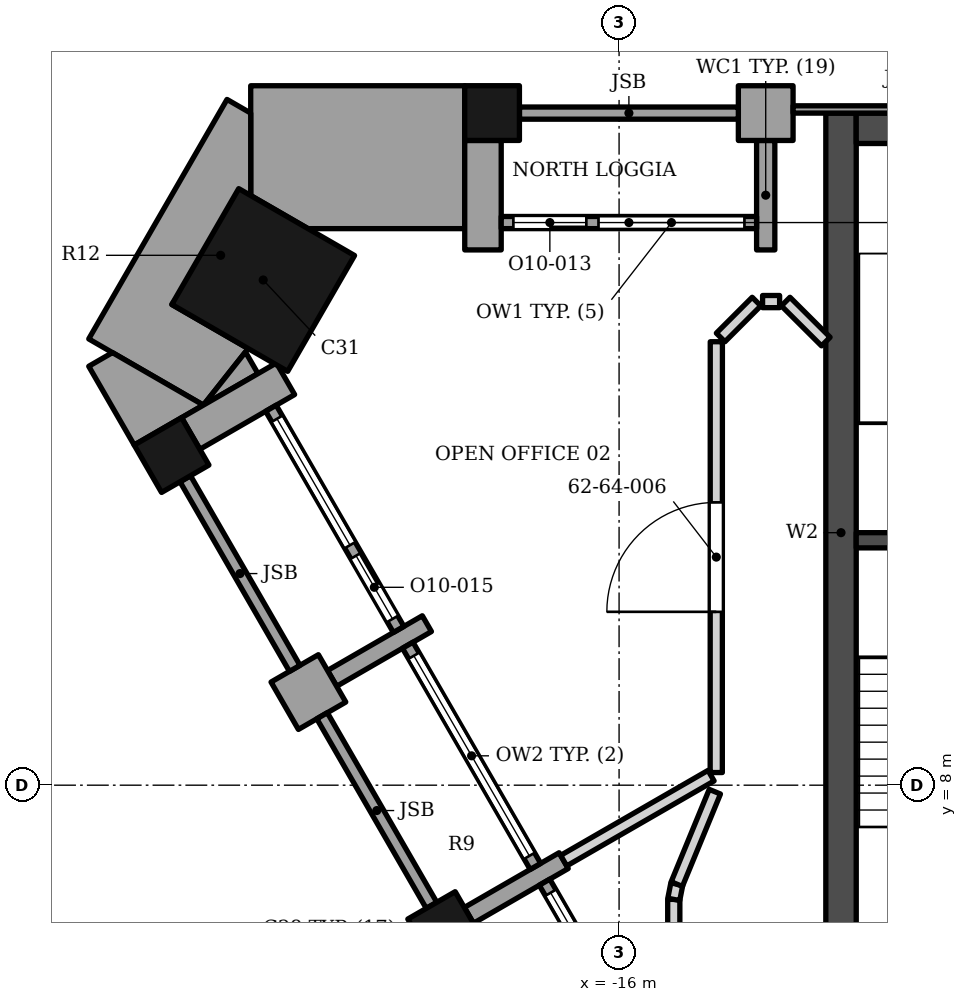
"""IFC4 building model, lengths in metres.
Left out: names, types, materials, properties, quantities, classifications, styles, units other than length and angle.
Written with IfcOpenShell. Run it as: python <this file> out.ifc"""

import sys

from ifc_helpers import new_model, si_unit, direction, frame, frame_2d, origin, origin_2d, place, context, subcontext, project, spatial, polyline, rectangle, outline, extrude, element, fill, save


model = new_model("IFC4")
c1 = context("Model", 3, precision=1e-05, world=origin(), true_north=direction((0.0, 1.0)))
c2 = subcontext(c1, "Body", "Model", "MODEL_VIEW")
j1 = project(units=[si_unit("LENGTHUNIT", "METRE"), si_unit("PLANEANGLEUNIT", "RADIAN")], contexts=[c1])
p1 = place(None, origin())
s1 = spatial("IfcSite", under=j1, at=p1, CompositionType="ELEMENT")
p2 = place(p1, origin())
s2 = spatial("IfcBuilding", under=s1, at=p2, CompositionType="ELEMENT")
p3 = place(p2, frame((0.0, 0.0, 259.9)))
s3 = spatial("IfcBuildingStorey", under=s2, at=p3, CompositionType="ELEMENT", Elevation=259.9)
p4 = place(p3, frame((-12.1, 18.802, 0.0), z_axis=(0.0, 0.0, 1.0), x_axis=(1.0, 0.0, 0.0)))
e1 = element("IfcWall", 1, at=p4, inside=s3, PredefinedType="SHEAR", context=c2, shape_type="SweptSolid", body=[
    extrude(rectangle(XDim=24.2, YDim=0.5, at=frame_2d((12.1, 0.0))), origin(), (0.0, 0.0, 1.0), 3.9),
])
p5 = place(p3, frame((-12.35, 5.253, 0.0), z_axis=(0.0, 0.0, 1.0), x_axis=(0.0, 1.0, 0.0)))
e2 = element("IfcWall", 2, at=p5, inside=s3, PredefinedType="SHEAR", context=c2, shape_type="SweptSolid", body=[
    extrude(rectangle(XDim=13.8, YDim=0.5, at=frame_2d((6.9, 0.0))), origin(), (0.0, 0.0, 1.0), 3.9),
])
p6 = place(p3, frame((-12.1, 12.028, 0.0), z_axis=(0.0, 0.0, 1.0), x_axis=(1.0, 0.0, 0.0)))
e3 = element("IfcWall", 3, at=p6, inside=s3, PredefinedType="SHEAR", context=c2, shape_type="SweptSolid", body=[
    extrude(rectangle(XDim=3.75, YDim=0.25, at=frame_2d((1.875, 0.0))), origin(), (0.0, 0.0, 1.0), 3.9),
])
p7 = place(p3, frame((-21.853, 16.308, 0.0), z_axis=(0.0, 0.0, 1.0), x_axis=(0.866025421238, -0.49999996977, 0.0)))
e4 = element("IfcColumn", 4, at=p7, inside=s3, PredefinedType="COLUMN", context=c2, shape_type="SweptSolid", body=[
    extrude(rectangle(XDim=2.2, YDim=2.2, at=origin_2d()), origin(), (0.0, 0.0, 1.0), 3.9),
])
for number, where, z_axis, x_axis in (
    (5, (-23.36, 13.429, 0.0), (0.0, 0.0, 1.0), (0.5, -0.866, 0.0)),
    (6, (-18.86, 5.634, 0.0), (0.0, 0.0, 1.0), (0.5, -0.866, 0.0)),
    (7, (-18.089, 19.053, 0.0), (0.0, 0.0, 1.0), (-1.0, 0.0, 0.0)),
):
    element("IfcColumn", number, at=place(p3, frame(where, z_axis=z_axis, x_axis=x_axis)), inside=s3, PredefinedType="COLUMN", context=c2, shape_type="SweptSolid", body=[
        extrude(rectangle(XDim=0.9, YDim=0.9, at=origin_2d()), origin(), (0.0, 0.0, 1.0), 3.9),
    ])
p8 = place(p3, frame((-21.486, 14.684, 0.0), z_axis=(0.0, 0.0, 1.0), x_axis=(-0.865989075817, -0.500062916607, 0.0)))
e8 = element("IfcWall", 8, at=p8, inside=s3, PredefinedType="SOLIDWALL", context=c2, shape_type="SweptSolid", body=[
    extrude(rectangle(XDim=1.8, YDim=0.6, at=frame_2d((0.9, 0.0))), origin(), (0.0, 0.0, 1.0), 3.0),
])
p9 = place(p3, frame((-21.334, 9.921, 0.0), z_axis=(0.0, 0.0, 1.0), x_axis=(0.50001992892, -0.866013897511, 0.0)))
e9 = element("IfcWall", 9, at=p9, inside=s3, PredefinedType="SOLIDWALL", context=c2, shape_type="SweptSolid", body=[
    extrude(rectangle(XDim=0.9, YDim=0.9, at=frame_2d((0.45, 0.0))), origin(), (0.0, 0.0, 1.0), 3.0),
])
p10 = place(p3, frame((-20.72, 9.757, 0.0), z_axis=(0.0, 0.0, 1.0), x_axis=(0.866047807691, 0.499961193289, 0.0)))
e10 = element("IfcWall", 10, at=p10, inside=s3, PredefinedType="SOLIDWALL", context=c2, shape_type="SweptSolid", body=[
    extrude(rectangle(XDim=1.8, YDim=0.3, at=frame_2d((0.9, 0.0))), origin(), (0.0, 0.0, 1.0), 3.0),
])
p11 = place(p3, frame((-16.911, 6.759, 0.0), z_axis=(0.0, 0.0, 1.0), x_axis=(-0.866047807691, -0.499961193289, 0.0)))
e11 = element("IfcWall", 11, at=p11, inside=s3, PredefinedType="SOLIDWALL", context=c2, shape_type="SweptSolid", body=[
    extrude(rectangle(XDim=1.8, YDim=0.3, at=frame_2d((0.9, 0.0))), origin(), (0.0, 0.0, 1.0), 2.95),
])
p12 = place(p3, frame((-23.135, 13.039, 0.0), z_axis=(0.0, 0.0, 1.0), x_axis=(0.500012057535, -0.866018442252, 0.0)))
e12 = element("IfcWall", 12, at=p12, inside=s3, PredefinedType="SOLIDWALL", context=c2, shape_type="SweptSolid", body=[
    extrude(rectangle(XDim=3.6, YDim=0.2, at=frame_2d((1.8, 0.0))), origin(), (0.0, 0.0, 1.0), 3.0),
])
p13 = place(p3, frame((-21.726, 14.199, 0.0), z_axis=(0.0, 0.0, 1.0), x_axis=(0.499958946799, -0.866049104564, 0.0)))
e13 = element("IfcWall", 13, at=p13, inside=s3, PredefinedType="ELEMENTEDWALL", context=c2, shape_type="SweptSolid", body=[
    extrude(rectangle(XDim=4.2, YDim=0.2, at=frame_2d((2.1, 0.0))), origin(), (0.0, 0.0, 1.0), 3.0),
])
p14 = place(p13, frame((0.2, 0.0, 0.45)))
e14 = element("IfcOpeningElement", 14, at=p14, cuts=e13, PredefinedType="OPENING", context=c2, shape_type="SweptSolid", body=[
    extrude(rectangle(XDim=2.4, YDim=2.25, at=frame_2d((1.2, 1.125))), frame((0.0, 0.11, 0.0), z_axis=(0.0, -1.0, 0.0), x_axis=(1.0, 0.0, 0.0)), (0.0, 0.0, 1.0), 0.22),
])
p15 = place(p13, frame((2.8, 0.0, 0.0)))
e15 = element("IfcOpeningElement", 15, at=p15, cuts=e13, PredefinedType="OPENING", context=c2, shape_type="SweptSolid", body=[
    extrude(rectangle(XDim=1.2, YDim=2.7, at=frame_2d((0.6, 1.35))), frame((0.0, 0.11, 0.0), z_axis=(0.0, -1.0, 0.0), x_axis=(1.0, 0.0, 0.0)), (0.0, 0.0, 1.0), 0.22),
])
p16 = place(p3, frame((-20.885, 9.142, 0.0), z_axis=(0.0, 0.0, 1.0), x_axis=(0.500012057535, -0.866018442252, 0.0)))
e16 = element("IfcWall", 16, at=p16, inside=s3, PredefinedType="SOLIDWALL", context=c2, shape_type="SweptSolid", body=[
    extrude(rectangle(XDim=3.6, YDim=0.2, at=frame_2d((1.8, 0.0))), origin(), (0.0, 0.0, 1.0), 3.0),
])
p17 = place(p3, frame((-19.476, 10.302, 0.0), z_axis=(0.0, 0.0, 1.0), x_axis=(0.49998411664, -0.866034573852, 0.0)))
e17 = element("IfcWall", 17, at=p17, inside=s3, PredefinedType="ELEMENTEDWALL", context=c2, shape_type="SweptSolid", body=[
    extrude(rectangle(XDim=4.2, YDim=0.2, at=frame_2d((2.1, 0.0))), origin(), (0.0, 0.0, 1.0), 3.0),
])
p18 = place(p17, frame((0.2, 0.0, 0.45)))
e18 = element("IfcOpeningElement", 18, at=p18, cuts=e17, PredefinedType="OPENING", context=c2, shape_type="SweptSolid", body=[
    extrude(rectangle(XDim=3.8, YDim=2.25, at=frame_2d((1.9, 1.125))), frame((0.0, 0.11, 0.0), z_axis=(0.0, -1.0, 0.0), x_axis=(1.0, 0.0, 0.0)), (0.0, 0.0, 1.0), 0.22),
])
p19 = place(p3, frame((-17.226, 6.405, 0.0), z_axis=(0.0, 0.0, 1.0), x_axis=(0.499958946799, -0.866049104564, 0.0)))
e19 = element("IfcWall", 19, at=p19, inside=s3, PredefinedType="ELEMENTEDWALL", context=c2, shape_type="SweptSolid", body=[
    extrude(rectangle(XDim=4.2, YDim=0.2, at=frame_2d((2.1, 0.0))), origin(), (0.0, 0.0, 1.0), 2.95),
])
p20 = place(p19, frame((0.2, 0.0, 0.45)))
e20 = element("IfcOpeningElement", 20, at=p20, cuts=e19, PredefinedType="OPENING", context=c2, shape_type="SweptSolid", body=[
    extrude(rectangle(XDim=2.4, YDim=2.25, at=frame_2d((1.2, 1.125))), frame((0.0, 0.11, 0.0), z_axis=(0.0, -1.0, 0.0), x_axis=(1.0, 0.0, 0.0)), (0.0, 0.0, 1.0), 0.22),
])
p21 = place(p19, frame((2.8, 0.0, 0.0)))
e21 = element("IfcOpeningElement", 21, at=p21, cuts=e19, PredefinedType="OPENING", context=c2, shape_type="SweptSolid", body=[
    extrude(rectangle(XDim=1.2, YDim=2.7, at=frame_2d((0.6, 1.35))), frame((0.0, 0.11, 0.0), z_axis=(0.0, -1.0, 0.0), x_axis=(1.0, 0.0, 0.0)), (0.0, 0.0, 1.0), 0.22),
])
p22 = place(p3, origin())
e22 = element("IfcWall", 22, at=p22, inside=s3, PredefinedType="SOLIDWALL", context=c2, shape_type="SweptSolid", body=[
    extrude(outline(polyline([(-13.138, 19.502), (-14.039, 19.502), (-14.039, 18.603), (-13.138, 18.603), (-13.138, 19.502)])), origin(), (0.0, 0.0, 1.0), 3.0),
])
p23 = place(p3, origin())
e23 = element("IfcWall", 23, at=p23, inside=s3, PredefinedType="SOLIDWALL", context=c2, shape_type="SweptSolid", body=[
    extrude(outline(polyline([(-13.438, 16.802), (-13.438, 18.603), (-13.739, 18.603), (-13.739, 16.802), (-13.438, 16.802)])), origin(), (0.0, 0.0, 1.0), 3.0),
])
p24 = place(p3, origin())
e24 = element("IfcWall", 24, at=p24, inside=s3, PredefinedType="SOLIDWALL", context=c2, shape_type="SweptSolid", body=[
    extrude(outline(polyline([(-18.539, 18.603), (-18.539, 16.802), (-17.938, 16.802), (-17.938, 18.603), (-18.539, 18.603)])), origin(), (0.0, 0.0, 1.0), 3.0),
])
p25 = place(p3, origin())
e25 = element("IfcWall", 25, at=p25, inside=s3, PredefinedType="SOLIDWALL", context=c2, shape_type="SweptSolid", body=[
    extrude(outline(polyline([(-13.138, 19.173), (-13.138, 19.052), (-9.539, 19.052), (-9.539, 19.173), (-13.138, 19.173)])), origin(), (0.0, 0.0, 1.0), 3.0),
])
p26 = place(p3, frame((-14.039, 19.052, 0.0), z_axis=(0.0, 0.0, 1.0), x_axis=(-1.0, 0.0, 0.0)))
e26 = element("IfcWall", 26, at=p26, inside=s3, PredefinedType="SOLIDWALL", context=c2, shape_type="SweptSolid", body=[
    extrude(rectangle(XDim=3.6, YDim=0.2, at=frame_2d((1.8, 0.0))), origin(), (0.0, 0.0, 1.0), 3.0),
])
p27 = place(p3, frame((-13.739, 17.252, 0.0), z_axis=(0.0, 0.0, 1.0), x_axis=(-1.0, 0.0, 0.0)))
e27 = element("IfcWall", 27, at=p27, inside=s3, PredefinedType="ELEMENTEDWALL", context=c2, shape_type="SweptSolid", body=[
    extrude(rectangle(XDim=4.2, YDim=0.2, at=frame_2d((2.1, 0.0))), origin(), (0.0, 0.0, 1.0), 3.0),
])
p28 = place(p27, frame((0.2, 0.0, 0.45)))
e28 = element("IfcOpeningElement", 28, at=p28, cuts=e27, PredefinedType="OPENING", context=c2, shape_type="SweptSolid", body=[
    extrude(rectangle(XDim=2.4, YDim=2.25, at=frame_2d((1.2, 1.125))), frame((0.0, 0.11, 0.0), z_axis=(0.0, -1.0, 0.0), x_axis=(1.0, 0.0, 0.0)), (0.0, 0.0, 1.0), 0.22),
])
p29 = place(p27, frame((2.8, 0.0, 0.0)))
e29 = element("IfcOpeningElement", 29, at=p29, cuts=e27, PredefinedType="OPENING", context=c2, shape_type="SweptSolid", body=[
    extrude(rectangle(XDim=1.2, YDim=2.7, at=frame_2d((0.6, 1.35))), frame((0.0, 0.11, 0.0), z_axis=(0.0, -1.0, 0.0), x_axis=(1.0, 0.0, 0.0)), (0.0, 0.0, 1.0), 0.22),
])
p30 = place(p3, origin())
e30 = element("IfcWall", 30, at=p30, inside=s3, PredefinedType="SOLIDWALL", context=c2, shape_type="SweptSolid", body=[
    extrude(outline(polyline([(-21.116, 17.153), (-18.539, 17.153), (-18.539, 18.603), (-18.539, 18.603), (-18.539, 19.502), (-22.058, 19.502), (-22.058, 17.697), (-21.116, 17.153)])), origin(), (0.0, 0.0, 1.0), 3.0),
])
p31 = place(p3, origin())
e31 = element("IfcWall", 31, at=p31, inside=s3, PredefinedType="SOLIDWALL", context=c2, shape_type="SweptSolid", body=[
    extrude(outline(polyline([(-23.356, 15.905), (-22.058, 17.697), (-22.058, 19.052), (-22.448, 19.278), (-24.722, 15.339), (-22.837, 14.25), (-22.1, 15.18), (-23.356, 15.905)])), origin(), (0.0, 0.0, 1.0), 3.0),
])
p32 = place(p3, origin())
e32 = element("IfcWall", 32, at=p32, inside=s3, PredefinedType="SOLIDWALL", context=c2, shape_type="SweptSolid", body=[
    extrude(outline(polyline([(-23.975, 13.594), (-23.195, 14.044), (-23.195, 14.043), (-22.837, 14.25), (-24.333, 15.114), (-24.722, 14.889), (-23.975, 13.594)])), origin(), (0.0, 0.0, 1.0), 3.0),
])
p33 = place(p3, origin())
e33 = element("IfcWall", 33, at=p33, inside=s3, PredefinedType="SOLIDWALL", context=c2, shape_type="SweptSolid", body=[
    extrude(outline(polyline([(-21.939, 14.768), (-22.145, 15.124), (-22.837, 14.25), (-21.939, 14.768)])), origin(), (0.0, 0.0, 1.0), 3.0),
])
p34 = place(p3, frame((-15.101, 5.5, 0.0), z_axis=(0.0, 0.0, 1.0), x_axis=(0.0, 1.0, 0.0)))
e34 = element("IfcWall", 34, at=p34, inside=s3, PredefinedType="PARTITIONING", context=c2, shape_type="SweptSolid", body=[
    extrude(rectangle(XDim=0.623, YDim=0.2, at=frame_2d((0.311, 0.0))), origin(), (0.0, 0.0, 1.0), 2.95),
])
p35 = place(p3, frame((-15.101, 6.122, 0.0), z_axis=(0.0, 0.0, 1.0), x_axis=(0.194465976514, 0.980909263887, 0.0)))
e35 = element("IfcWall", 35, at=p35, inside=s3, PredefinedType="PARTITIONING", context=c2, shape_type="SweptSolid", body=[
    extrude(rectangle(XDim=0.256, YDim=0.2, at=frame_2d((0.128, 0.0))), origin(), (0.0, 0.0, 1.0), 2.95),
])
p36 = place(p3, frame((-15.051, 6.373, 0.0), z_axis=(0.0, 0.0, 1.0), x_axis=(0.380772221762, 0.92466886783, 0.0)))
e36 = element("IfcWall", 36, at=p36, inside=s3, PredefinedType="PARTITIONING", context=c2, shape_type="SweptSolid", body=[
    extrude(rectangle(XDim=1.643, YDim=0.2, at=frame_2d((0.822, 0.0))), origin(), (0.0, 0.0, 1.0), 3.73),
])
p37 = place(p3, frame((-16.911, 6.759, 0.0), z_axis=(0.0, 0.0, 1.0), x_axis=(0.866362772616, 0.499415204239, 0.0)))
e37 = element("IfcWall", 37, at=p37, inside=s3, PredefinedType="PARTITIONING", context=c2, shape_type="SweptSolid", body=[
    extrude(rectangle(XDim=2.798, YDim=0.2, at=frame_2d((1.399, 0.0))), origin(), (0.0, 0.0, 1.0), 3.73),
])
p38 = place(p3, frame((-14.402, 8.208, 0.0), z_axis=(0.0, 0.0, 1.0), x_axis=(0.000241221262, 0.999999970906, 0.0)))
e38 = element("IfcWall", 38, at=p38, inside=s3, PredefinedType="PARTITIONING", context=c2, shape_type="SweptSolid", body=[
    extrude(rectangle(XDim=7.085, YDim=0.2, at=frame_2d((3.542, 0.0))), origin(), (0.0, 0.0, 1.0), 3.73),
])
p39 = place(p38, frame((2.643, 0.0, 0.0)))
e39 = element("IfcOpeningElement", 39, at=p39, cuts=e38, PredefinedType="OPENING", context=c2, shape_type="SweptSolid", body=[
    extrude(rectangle(XDim=1.8, YDim=2.4, at=frame_2d((0.9, 1.2))), frame((0.0, 0.11, 0.0), z_axis=(0.0, -1.0, 0.0), x_axis=(1.0, 0.0, 0.0)), (0.0, 0.0, 1.0), 0.22),
])
p40 = place(p3, frame((-14.33, 15.363, 0.0), z_axis=(0.0, 0.0, 1.0), x_axis=(0.707106781187, 0.707106781187, 0.0)))
e40 = element("IfcWall", 40, at=p40, inside=s3, PredefinedType="PARTITIONING", context=c2, shape_type="SweptSolid", body=[
    extrude(rectangle(XDim=0.834, YDim=0.2, at=frame_2d((0.417, 0.0))), origin(), (0.0, 0.0, 1.0), 3.73),
])
p41 = place(p3, frame((-13.64, 15.953, 0.0), z_axis=(0.0, 0.0, 1.0), x_axis=(1.0, 0.0, 0.0)))
e41 = element("IfcWall", 41, at=p41, inside=s3, PredefinedType="PARTITIONING", context=c2, shape_type="SweptSolid", body=[
    extrude(rectangle(XDim=0.28, YDim=0.2, at=frame_2d((0.14, 0.0))), origin(), (0.0, 0.0, 1.0), 3.73),
])
p42 = place(p3, frame((-13.26, 15.953, 0.0), z_axis=(0.0, 0.0, 1.0), x_axis=(0.708285399161, -0.705926195389, 0.0)))
e42 = element("IfcWall", 42, at=p42, inside=s3, PredefinedType="PARTITIONING", context=c2, shape_type="SweptSolid", body=[
    extrude(rectangle(XDim=0.931, YDim=0.2, at=frame_2d((0.466, 0.0))), origin(), (0.0, 0.0, 1.0), 3.73),
])
p43 = place(p14, origin())
e43 = element("IfcWindow", 43, at=p43, inside=s3, PartitioningType="SINGLE_PANEL", PredefinedType="WINDOW", context=c2, shape_type="SweptSolid", body=[
    extrude(rectangle(XDim=2.4, YDim=2.25, at=frame_2d((1.2, 1.125))), frame((0.0, 0.03, 0.0), z_axis=(0.0, -1.0, 0.0), x_axis=(1.0, 0.0, 0.0)), (0.0, 0.0, 1.0), 0.06),
])
fill(e14, e43)
p44 = place(p15, origin())
e44 = element("IfcDoor", 44, at=p44, inside=s3, OperationType="SINGLE_SWING_LEFT", PredefinedType="DOOR", context=c2, shape_type="SweptSolid", body=[
    extrude(rectangle(XDim=1.2, YDim=2.7, at=frame_2d((0.6, 1.35))), frame((0.0, 0.025, 0.0), z_axis=(0.0, -1.0, 0.0), x_axis=(1.0, 0.0, 0.0)), (0.0, 0.0, 1.0), 0.05),
])
fill(e15, e44)
p45 = place(p18, origin())
e45 = element("IfcWindow", 45, at=p45, inside=s3, PartitioningType="SINGLE_PANEL", PredefinedType="WINDOW", context=c2, shape_type="SweptSolid", body=[
    extrude(rectangle(XDim=3.8, YDim=2.25, at=frame_2d((1.9, 1.125))), frame((0.0, 0.03, 0.0), z_axis=(0.0, -1.0, 0.0), x_axis=(1.0, 0.0, 0.0)), (0.0, 0.0, 1.0), 0.06),
])
fill(e18, e45)
p46 = place(p20, origin())
e46 = element("IfcWindow", 46, at=p46, inside=s3, PartitioningType="SINGLE_PANEL", PredefinedType="WINDOW", context=c2, shape_type="SweptSolid", body=[
    extrude(rectangle(XDim=2.4, YDim=2.25, at=frame_2d((1.2, 1.125))), frame((0.0, 0.03, 0.0), z_axis=(0.0, -1.0, 0.0), x_axis=(1.0, 0.0, 0.0)), (0.0, 0.0, 1.0), 0.06),
])
fill(e20, e46)
p47 = place(p28, origin())
e47 = element("IfcWindow", 47, at=p47, inside=s3, PartitioningType="SINGLE_PANEL", PredefinedType="WINDOW", context=c2, shape_type="SweptSolid", body=[
    extrude(rectangle(XDim=2.4, YDim=2.25, at=frame_2d((1.2, 1.125))), frame((0.0, 0.03, 0.0), z_axis=(0.0, -1.0, 0.0), x_axis=(1.0, 0.0, 0.0)), (0.0, 0.0, 1.0), 0.06),
])
fill(e28, e47)
p48 = place(p29, origin())
e48 = element("IfcDoor", 48, at=p48, inside=s3, OperationType="SINGLE_SWING_LEFT", PredefinedType="DOOR", context=c2, shape_type="SweptSolid", body=[
    extrude(rectangle(XDim=1.2, YDim=2.7, at=frame_2d((0.6, 1.35))), frame((0.0, 0.025, 0.0), z_axis=(0.0, -1.0, 0.0), x_axis=(1.0, 0.0, 0.0)), (0.0, 0.0, 1.0), 0.05),
])
fill(e29, e48)
p49 = place(p39, origin())
e49 = element("IfcDoor", 49, at=p49, inside=s3, OperationType="DOUBLE_DOOR_SINGLE_SWING", PredefinedType="DOOR", context=c2, shape_type="SweptSolid", body=[
    extrude(rectangle(XDim=1.8, YDim=2.4, at=frame_2d((0.9, 1.2))), frame((0.0, 0.025, 0.0), z_axis=(0.0, -1.0, 0.0), x_axis=(1.0, 0.0, 0.0)), (0.0, 0.0, 1.0), 0.05),
])
fill(e39, e49)
save(model, sys.argv[1])
